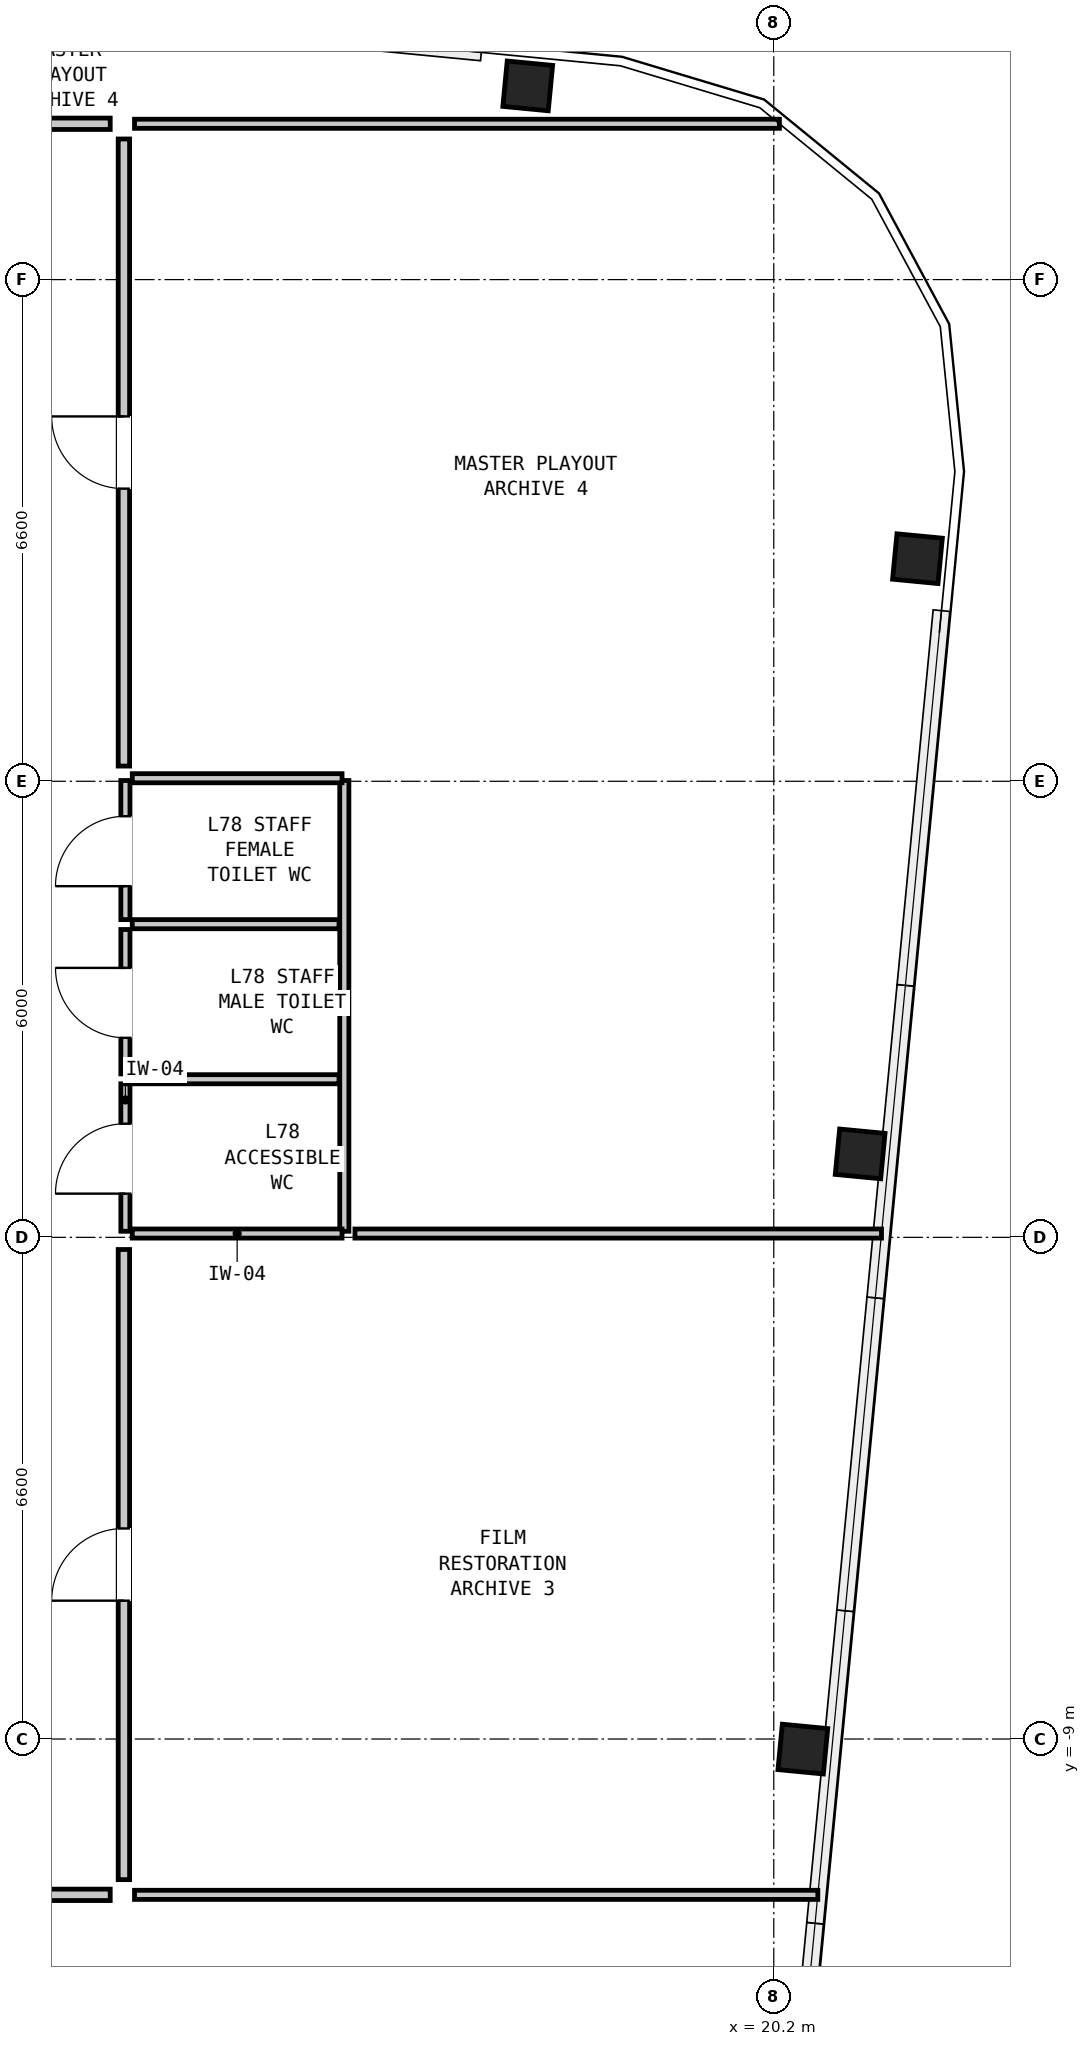
"""IFC4 building model, lengths in metres.
Left out: names, types, materials, properties, quantities, classifications, styles, units other than length and angle.
Written with IfcOpenShell. Run it as: python <this file> out.ifc"""

import sys

from ifc_helpers import new_model, si_unit, direction, frame, frame_2d, origin, origin_2d, place, context, subcontext, project, spatial, rectangle, hollow_rectangle, extrude, element, fill, save


model = new_model("IFC4")
c1 = context("Model", 3, precision=1e-05, world=origin(), true_north=direction((0.0, 1.0)))
c2 = subcontext(c1, "Body", "Model", "MODEL_VIEW")
j1 = project(units=[si_unit("LENGTHUNIT", "METRE"), si_unit("PLANEANGLEUNIT", "RADIAN")], contexts=[c1])
p1 = place(None, origin())
s1 = spatial("IfcSite", under=j1, at=p1, CompositionType="ELEMENT")
p2 = place(p1, origin())
s2 = spatial("IfcBuilding", under=s1, at=p2, CompositionType="ELEMENT")
p3 = place(p2, frame((0.0, 0.0, 264.2)))
s3 = spatial("IfcBuildingStorey", under=s2, at=p3, CompositionType="ELEMENT", Elevation=264.2)
for number, where, z_axis, x_axis in (
    (1, (20.583, -9.133, 0.0), (0.0, 0.0, 1.0), (0.096, 0.995, 0.0)),
    (2, (21.336, -1.302, 0.0), (0.0, 0.0, 1.0), (0.096, 0.995, 0.0)),
    (3, (22.09, 6.528, 0.0), (0.0, 0.0, 1.0), (0.096, 0.995, 0.0)),
    (4, (16.963, 12.749, 0.0), (0.0, 0.0, 1.0), (0.995, -0.096, 0.0)),
):
    element("IfcColumn", number, at=place(p3, frame(where, z_axis=z_axis, x_axis=x_axis)), inside=s3, PredefinedType="COLUMN", context=c2, shape_type="SweptSolid", body=[
        extrude(hollow_rectangle(XDim=0.6, YDim=0.6, WallThickness=0.04, at=origin_2d()), origin(), (0.0, 0.0, 1.0), 3.05),
    ])
p4 = place(p3, frame((11.67, -2.32, 0.0), z_axis=(0.0, 0.0, 1.0), x_axis=(0.0, 1.0, 0.0)))
e5 = element("IfcWall", 5, at=p4, inside=s3, PredefinedType="PARTITIONING", context=c2, shape_type="SweptSolid", body=[
    extrude(rectangle(XDim=1.94, YDim=0.12, at=frame_2d((0.97, 0.0))), origin(), (0.0, 0.0, 1.0), 2.86),
])
p5 = place(p4, frame((0.495, 0.0, 0.0)))
e6 = element("IfcOpeningElement", 6, at=p5, cuts=e5, PredefinedType="OPENING", context=c2, shape_type="SweptSolid", body=[
    extrude(rectangle(XDim=0.92, YDim=2.1, at=frame_2d((0.46, 1.05))), frame((0.0, 0.072, 0.0), z_axis=(0.0, -1.0, 0.0), x_axis=(1.0, 0.0, 0.0)), (0.0, 0.0, 1.0), 0.144),
])
p6 = place(p3, frame((11.67, -0.25, 0.0), z_axis=(0.0, 0.0, 1.0), x_axis=(0.0, 1.0, 0.0)))
e7 = element("IfcWall", 7, at=p6, inside=s3, PredefinedType="PARTITIONING", context=c2, shape_type="SweptSolid", body=[
    extrude(rectangle(XDim=1.9, YDim=0.12, at=frame_2d((0.95, 0.0))), origin(), (0.0, 0.0, 1.0), 2.86),
])
p7 = place(p6, frame((0.475, 0.0, 0.0)))
e8 = element("IfcOpeningElement", 8, at=p7, cuts=e7, PredefinedType="OPENING", context=c2, shape_type="SweptSolid", body=[
    extrude(rectangle(XDim=0.92, YDim=2.1, at=frame_2d((0.46, 1.05))), frame((0.0, 0.072, 0.0), z_axis=(0.0, -1.0, 0.0), x_axis=(1.0, 0.0, 0.0)), (0.0, 0.0, 1.0), 0.144),
])
p8 = place(p3, frame((11.67, 1.78, 0.0), z_axis=(0.0, 0.0, 1.0), x_axis=(0.0, 1.0, 0.0)))
e9 = element("IfcWall", 9, at=p8, inside=s3, PredefinedType="PARTITIONING", context=c2, shape_type="SweptSolid", body=[
    extrude(rectangle(XDim=1.83, YDim=0.12, at=frame_2d((0.915, 0.0))), origin(), (0.0, 0.0, 1.0), 2.86),
])
p9 = place(p8, frame((0.44, 0.0, 0.0)))
e10 = element("IfcOpeningElement", 10, at=p9, cuts=e9, PredefinedType="OPENING", context=c2, shape_type="SweptSolid", body=[
    extrude(rectangle(XDim=0.92, YDim=2.1, at=frame_2d((0.46, 1.05))), frame((0.0, 0.072, 0.0), z_axis=(0.0, -1.0, 0.0), x_axis=(1.0, 0.0, 0.0)), (0.0, 0.0, 1.0), 0.144),
])
p10 = place(p3, frame((14.55, -2.32, 0.0), z_axis=(0.0, 0.0, 1.0), x_axis=(0.0, 1.0, 0.0)))
e11 = element("IfcWall", 11, at=p10, inside=s3, PredefinedType="PARTITIONING", context=c2, shape_type="SweptSolid", body=[
    extrude(rectangle(XDim=5.93, YDim=0.12, at=frame_2d((2.965, 0.0))), origin(), (0.0, 0.0, 1.0), 2.86),
])
for number, where, z_axis, x_axis in (
    (12, (11.76, -2.35, 0.0), (0.0, 0.0, 1.0), (1.0, 0.0, 0.0)),
    (13, (11.76, 3.64, 0.0), (0.0, 0.0, 1.0), (1.0, 0.0, 0.0)),
):
    element("IfcWall", number, at=place(p3, frame(where, z_axis=z_axis, x_axis=x_axis)), inside=s3, PredefinedType="PARTITIONING", context=c2, shape_type="SweptSolid", body=[
        extrude(rectangle(XDim=2.76, YDim=0.12, at=frame_2d((1.38, 0.0))), origin(), (0.0, 0.0, 1.0), 1.981),
    ])
for number, where, z_axis, x_axis in (
    (14, (11.76, -0.32, 0.0), (0.0, 0.0, 1.0), (1.0, 0.0, 0.0)),
    (15, (11.76, 1.72, 0.0), (0.0, 0.0, 1.0), (1.0, 0.0, 0.0)),
):
    element("IfcWall", number, at=place(p3, frame(where, z_axis=z_axis, x_axis=x_axis)), inside=s3, PredefinedType="PARTITIONING", context=c2, shape_type="SweptSolid", body=[
        extrude(rectangle(XDim=2.72, YDim=0.12, at=frame_2d((1.36, 0.0))), origin(), (0.0, 0.0, 1.0), 2.86),
    ])
p11 = place(p3, frame((11.79, 12.25, 0.0), z_axis=(0.0, 0.0, 1.0), x_axis=(1.0, 0.0, 0.0)))
e16 = element("IfcWall", 16, at=p11, inside=s3, PredefinedType="PARTITIONING", context=c2, shape_type="SweptSolid", body=[
    extrude(rectangle(XDim=8.484, YDim=0.12, at=frame_2d((4.242, 0.0))), origin(), (0.0, 0.0, 1.0), 2.86),
])
p12 = place(p3, frame((11.79, -11.05, 0.0), z_axis=(0.0, 0.0, 1.0), x_axis=(1.0, 0.0, 0.0)))
e17 = element("IfcWall", 17, at=p12, inside=s3, PredefinedType="PARTITIONING", context=c2, shape_type="SweptSolid", body=[
    extrude(rectangle(XDim=8.99, YDim=0.12, at=frame_2d((4.495, 0.0))), origin(), (0.0, 0.0, 1.0), 2.86),
])
p13 = place(p3, frame((14.69, -2.35, 0.0), z_axis=(0.0, 0.0, 1.0), x_axis=(1.0, 0.0, 0.0)))
e18 = element("IfcWall", 18, at=p13, inside=s3, PredefinedType="PARTITIONING", context=c2, shape_type="SweptSolid", body=[
    extrude(rectangle(XDim=6.927, YDim=0.12, at=frame_2d((3.464, 0.0))), origin(), (0.0, 0.0, 1.0), 1.981),
])
p14 = place(p3, frame((6.68, 12.25, 0.0), z_axis=(0.0, 0.0, 1.0), x_axis=(1.0, 0.0, 0.0)))
e19 = element("IfcWall", 19, at=p14, inside=s3, PredefinedType="PARTITIONING", context=c2, shape_type="SweptSolid", body=[
    extrude(rectangle(XDim=4.79, YDim=0.15, at=frame_2d((2.395, 0.0))), origin(), (0.0, 0.0, 1.0), 2.86),
])
p15 = place(p14, frame((0.92, 0.0, 0.0)))
e20 = element("IfcOpeningElement", 20, at=p15, cuts=e19, PredefinedType="OPENING", context=c2, shape_type="SweptSolid", body=[
    extrude(rectangle(XDim=0.95, YDim=2.1, at=frame_2d((0.475, 1.05))), frame((0.0, 0.087, 0.0), z_axis=(0.0, -1.0, 0.0), x_axis=(1.0, 0.0, 0.0)), (0.0, 0.0, 1.0), 0.174),
])
p16 = place(p3, frame((7.68, -11.05, 0.0), z_axis=(0.0, 0.0, 1.0), x_axis=(1.0, 0.0, 0.0)))
e21 = element("IfcWall", 21, at=p16, inside=s3, PredefinedType="PARTITIONING", context=c2, shape_type="SweptSolid", body=[
    extrude(rectangle(XDim=3.79, YDim=0.15, at=frame_2d((1.895, 0.0))), origin(), (0.0, 0.0, 1.0), 2.86),
])
p17 = place(p16, frame((2.02, 0.0, 0.0)))
e22 = element("IfcOpeningElement", 22, at=p17, cuts=e21, PredefinedType="OPENING", context=c2, shape_type="SweptSolid", body=[
    extrude(rectangle(XDim=0.95, YDim=2.1, at=frame_2d((0.475, 1.05))), frame((0.0, 0.087, 0.0), z_axis=(0.0, -1.0, 0.0), x_axis=(1.0, 0.0, 0.0)), (0.0, 0.0, 1.0), 0.174),
])
p18 = place(p3, frame((11.65, -10.85, 0.0), z_axis=(0.0, 0.0, 1.0), x_axis=(0.0, 1.0, 0.0)))
e23 = element("IfcWall", 23, at=p18, inside=s3, PredefinedType="PARTITIONING", context=c2, shape_type="SweptSolid", body=[
    extrude(rectangle(XDim=8.29, YDim=0.15, at=frame_2d((4.145, 0.0))), origin(), (0.0, 0.0, 1.0), 2.86),
])
p19 = place(p18, frame((3.67, 0.0, 0.0)))
e24 = element("IfcOpeningElement", 24, at=p19, cuts=e23, PredefinedType="OPENING", context=c2, shape_type="SweptSolid", body=[
    extrude(rectangle(XDim=0.95, YDim=2.1, at=frame_2d((0.475, 1.05))), frame((0.0, 0.087, 0.0), z_axis=(0.0, -1.0, 0.0), x_axis=(1.0, 0.0, 0.0)), (0.0, 0.0, 1.0), 0.174),
])
p20 = place(p3, frame((11.65, 3.8, 0.0), z_axis=(0.0, 0.0, 1.0), x_axis=(0.0, 1.0, 0.0)))
e25 = element("IfcWall", 25, at=p20, inside=s3, PredefinedType="PARTITIONING", context=c2, shape_type="SweptSolid", body=[
    extrude(rectangle(XDim=8.25, YDim=0.15, at=frame_2d((4.125, 0.0))), origin(), (0.0, 0.0, 1.0), 2.86),
])
p21 = place(p20, frame((3.65, 0.0, 0.0)))
e26 = element("IfcOpeningElement", 26, at=p21, cuts=e25, PredefinedType="OPENING", context=c2, shape_type="SweptSolid", body=[
    extrude(rectangle(XDim=0.95, YDim=2.1, at=frame_2d((0.475, 1.05))), frame((0.0, 0.087, 0.0), z_axis=(0.0, -1.0, 0.0), x_axis=(1.0, 0.0, 0.0)), (0.0, 0.0, 1.0), 0.174),
])
p22 = place(p5, origin())
e27 = element("IfcDoor", 27, at=p22, inside=s3, OperationType="SINGLE_SWING_LEFT", PredefinedType="DOOR", context=c2, shape_type="SweptSolid", body=[
    extrude(rectangle(XDim=0.92, YDim=2.1, at=frame_2d((0.46, 1.05))), frame((0.0, 0.025, 0.0), z_axis=(0.0, -1.0, 0.0), x_axis=(1.0, 0.0, 0.0)), (0.0, 0.0, 1.0), 0.05),
])
fill(e6, e27)
p23 = place(p7, origin())
e28 = element("IfcDoor", 28, at=p23, inside=s3, OperationType="SINGLE_SWING_RIGHT", PredefinedType="DOOR", context=c2, shape_type="SweptSolid", body=[
    extrude(rectangle(XDim=0.92, YDim=2.1, at=frame_2d((0.46, 1.05))), frame((0.0, 0.025, 0.0), z_axis=(0.0, -1.0, 0.0), x_axis=(1.0, 0.0, 0.0)), (0.0, 0.0, 1.0), 0.05),
])
fill(e8, e28)
p24 = place(p9, origin())
e29 = element("IfcDoor", 29, at=p24, inside=s3, OperationType="SINGLE_SWING_LEFT", PredefinedType="DOOR", context=c2, shape_type="SweptSolid", body=[
    extrude(rectangle(XDim=0.92, YDim=2.1, at=frame_2d((0.46, 1.05))), frame((0.0, 0.025, 0.0), z_axis=(0.0, -1.0, 0.0), x_axis=(1.0, 0.0, 0.0)), (0.0, 0.0, 1.0), 0.05),
])
fill(e10, e29)
p25 = place(p19, origin())
e30 = element("IfcDoor", 30, at=p25, inside=s3, OperationType="SINGLE_SWING_LEFT", PredefinedType="DOOR", context=c2, shape_type="SweptSolid", body=[
    extrude(rectangle(XDim=0.95, YDim=2.1, at=frame_2d((0.475, 1.05))), frame((0.0, 0.025, 0.0), z_axis=(0.0, -1.0, 0.0), x_axis=(1.0, 0.0, 0.0)), (0.0, 0.0, 1.0), 0.05),
])
fill(e24, e30)
p26 = place(p21, origin())
e31 = element("IfcDoor", 31, at=p26, inside=s3, OperationType="SINGLE_SWING_RIGHT", PredefinedType="DOOR", context=c2, shape_type="SweptSolid", body=[
    extrude(rectangle(XDim=0.95, YDim=2.1, at=frame_2d((0.475, 1.05))), frame((0.0, 0.025, 0.0), z_axis=(0.0, -1.0, 0.0), x_axis=(1.0, 0.0, 0.0)), (0.0, 0.0, 1.0), 0.05),
])
fill(e26, e31)
save(model, sys.argv[1])
